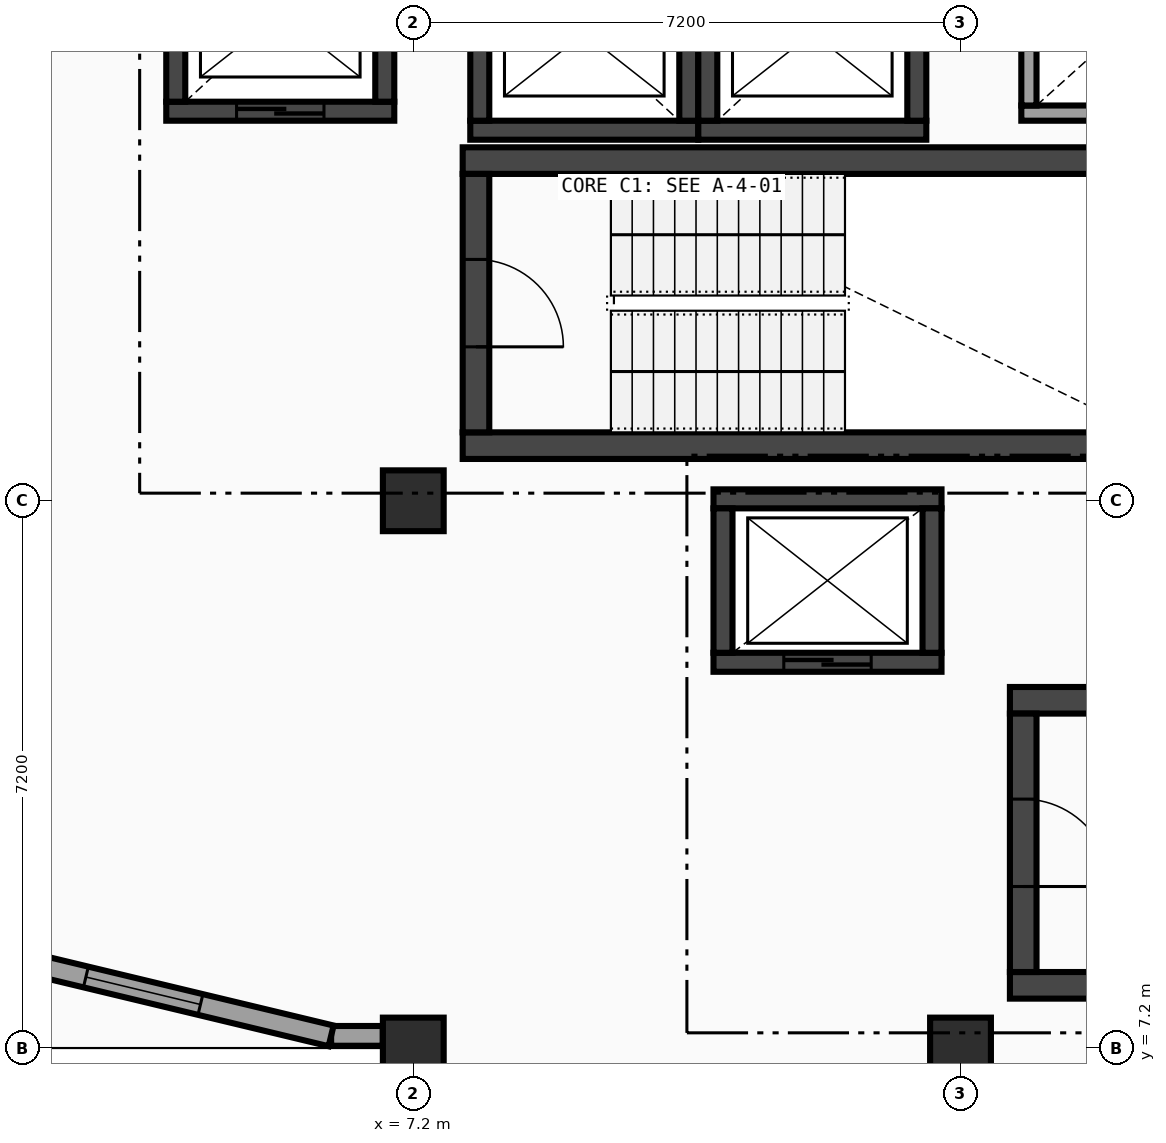
"""IFC4 building model, lengths in metres.
Left out: names, types, materials, properties, quantities, classifications, styles, units other than length and angle.
Written with IfcOpenShell. Run it as: python <this file> out.ifc"""

import sys

from ifc_helpers import new_model, si_unit, direction, frame, frame_2d, origin, origin_2d, place, context, subcontext, project, spatial, rectangle, extrude, element, fill, save


model = new_model("IFC4")
c1 = context("Model", 3, precision=1e-05, world=origin(), true_north=direction((0.0, 1.0)))
c2 = subcontext(c1, "Body", "Model", "MODEL_VIEW")
j1 = project(units=[si_unit("LENGTHUNIT", "METRE"), si_unit("PLANEANGLEUNIT", "RADIAN")], contexts=[c1])
p1 = place(None, origin())
s1 = spatial("IfcSite", under=j1, at=p1, CompositionType="ELEMENT")
p2 = place(p1, origin())
s2 = spatial("IfcBuilding", under=s1, at=p2, CompositionType="ELEMENT")
p3 = place(p2, frame((0.0, 0.0, 14.7)))
s3 = spatial("IfcBuildingStorey", under=s2, at=p3, CompositionType="ELEMENT", Elevation=14.7)
for number, where, z_axis, x_axis in (
    (1, (7.2, 7.2, 0.0), (0.0, 0.0, 1.0), (1.0, 0.0, 0.0)),
    (2, (7.2, 14.4, 0.0), (0.0, 0.0, 1.0), (1.0, 0.0, 0.0)),
    (3, (14.4, 7.2, 0.0), (0.0, 0.0, 1.0), (1.0, 0.0, 0.0)),
):
    element("IfcColumn", number, at=place(p3, frame(where, z_axis=z_axis, x_axis=x_axis)), inside=s3, PredefinedType="COLUMN", context=c2, shape_type="SweptSolid", body=[
        extrude(rectangle(XDim=0.8, YDim=0.8, at=origin_2d()), origin(), (0.0, 0.0, 1.0), 4.2),
    ])
p4 = place(p3, frame((6.799, 7.36, 0.0), z_axis=(0.0, 0.0, 1.0), x_axis=(-1.0, 0.0, 0.0)))
e4 = element("IfcWall", 4, at=p4, inside=s3, PredefinedType="SOLIDWALL", context=c2, shape_type="SweptSolid", body=[
    extrude(rectangle(XDim=0.68, YDim=0.26, at=frame_2d((0.34, 0.0))), origin(), (0.0, 0.0, 1.0), 3.352),
])
p5 = place(p3, frame((6.119, 7.36, 0.0), z_axis=(0.0, 0.0, 1.0), x_axis=(-0.972372921374, 0.233432863536, 0.0)))
e5 = element("IfcWall", 5, at=p5, inside=s3, PredefinedType="SOLIDWALL", context=c2, shape_type="SweptSolid", body=[
    extrude(rectangle(XDim=5.086, YDim=0.28, at=frame_2d((2.543, 0.0))), origin(), (0.0, 0.0, 1.0), 3.352),
])
p6 = place(p5, frame((1.768, 0.0, 0.8)))
e6 = element("IfcOpeningElement", 6, at=p6, cuts=e5, PredefinedType="OPENING", context=c2, shape_type="SweptSolid", body=[
    extrude(rectangle(XDim=1.55, YDim=1.8, at=frame_2d((0.775, 0.9))), frame((0.0, 0.15, 0.0), z_axis=(0.0, -1.0, 0.0), x_axis=(1.0, 0.0, 0.0)), (0.0, 0.0, 1.0), 0.3),
])
for number, where, z_axis, x_axis in (
    (7, (7.85, 15.125, 0.0), (0.0, 0.0, 1.0), (1.0, 0.0, 0.0)),
    (8, (17.15, 18.875, 0.0), (0.0, 0.0, 1.0), (-1.0, 0.0, 0.0)),
):
    element("IfcWall", number, at=place(p3, frame(where, z_axis=z_axis, x_axis=x_axis)), inside=s3, PredefinedType="SHEAR", context=c2, shape_type="SweptSolid", body=[
        extrude(rectangle(XDim=9.3, YDim=0.35, at=frame_2d((4.65, 0.0))), origin(), (0.0, 0.0, 1.0), 3.95),
    ])
p7 = place(p3, frame((8.025, 18.7, 0.0), z_axis=(0.0, 0.0, 1.0), x_axis=(0.0, -1.0, 0.0)))
e9 = element("IfcWall", 9, at=p7, inside=s3, PredefinedType="SHEAR", context=c2, shape_type="SweptSolid", body=[
    extrude(rectangle(XDim=3.4, YDim=0.35, at=frame_2d((1.7, 0.0))), origin(), (0.0, 0.0, 1.0), 3.95),
])
p8 = place(p7, frame((1.125, 0.0, 0.0)))
e10 = element("IfcOpeningElement", 10, at=p8, cuts=e9, PredefinedType="OPENING", context=c2, shape_type="SweptSolid", body=[
    extrude(rectangle(XDim=1.15, YDim=2.1, at=frame_2d((0.575, 1.05))), frame((0.0, 0.185, 0.0), z_axis=(0.0, -1.0, 0.0), x_axis=(1.0, 0.0, 0.0)), (0.0, 0.0, 1.0), 0.37),
])
p9 = place(p3, frame((3.95, 19.525, 0.0), z_axis=(0.0, 0.0, 1.0), x_axis=(1.0, 0.0, 0.0)))
e11 = element("IfcWall", 11, at=p9, inside=s3, PredefinedType="SHEAR", context=c2, shape_type="SweptSolid", body=[
    extrude(rectangle(XDim=3.0, YDim=0.25, at=frame_2d((1.5, 0.0))), origin(), (0.0, 0.0, 1.0), 3.95),
])
p10 = place(p9, frame((0.925, 0.0, 0.0)))
e12 = element("IfcOpeningElement", 12, at=p10, cuts=e11, PredefinedType="OPENING", context=c2, shape_type="SweptSolid", body=[
    extrude(rectangle(XDim=1.15, YDim=2.1, at=frame_2d((0.575, 1.05))), frame((0.0, 0.135, 0.0), z_axis=(0.0, -1.0, 0.0), x_axis=(1.0, 0.0, 0.0)), (0.0, 0.0, 1.0), 0.27),
])
for number, where, z_axis, x_axis in (
    (13, (4.075, 21.95, 0.0), (0.0, 0.0, 1.0), (0.0, -1.0, 0.0)),
    (14, (6.825, 19.65, 0.0), (0.0, 0.0, 1.0), (0.0, 1.0, 0.0)),
):
    element("IfcWall", number, at=place(p3, frame(where, z_axis=z_axis, x_axis=x_axis)), inside=s3, PredefinedType="SHEAR", context=c2, shape_type="SweptSolid", body=[
        extrude(rectangle(XDim=2.3, YDim=0.25, at=frame_2d((1.15, 0.0))), origin(), (0.0, 0.0, 1.0), 3.95),
    ])
p11 = place(p3, frame((7.95, 19.275, 0.0), z_axis=(0.0, 0.0, 1.0), x_axis=(1.0, 0.0, 0.0)))
e15 = element("IfcWall", 15, at=p11, inside=s3, PredefinedType="SHEAR", context=c2, shape_type="SweptSolid", body=[
    extrude(rectangle(XDim=3.0, YDim=0.25, at=frame_2d((1.5, 0.0))), origin(), (0.0, 0.0, 1.0), 3.95),
])
for number, where, z_axis, x_axis in (
    (16, (8.075, 21.7, 0.0), (0.0, 0.0, 1.0), (0.0, -1.0, 0.0)),
    (17, (10.825, 19.4, 0.0), (0.0, 0.0, 1.0), (0.0, 1.0, 0.0)),
):
    element("IfcWall", number, at=place(p3, frame(where, z_axis=z_axis, x_axis=x_axis)), inside=s3, PredefinedType="SHEAR", context=c2, shape_type="SweptSolid", body=[
        extrude(rectangle(XDim=2.3, YDim=0.25, at=frame_2d((1.15, 0.0))), origin(), (0.0, 0.0, 1.0), 3.95),
    ])
p12 = place(p3, frame((10.95, 19.275, 0.0), z_axis=(0.0, 0.0, 1.0), x_axis=(1.0, 0.0, 0.0)))
e18 = element("IfcWall", 18, at=p12, inside=s3, PredefinedType="SHEAR", context=c2, shape_type="SweptSolid", body=[
    extrude(rectangle(XDim=3.0, YDim=0.25, at=frame_2d((1.5, 0.0))), origin(), (0.0, 0.0, 1.0), 3.95),
])
for number, where, z_axis, x_axis in (
    (19, (11.075, 21.7, 0.0), (0.0, 0.0, 1.0), (0.0, -1.0, 0.0)),
    (20, (13.825, 19.4, 0.0), (0.0, 0.0, 1.0), (0.0, 1.0, 0.0)),
):
    element("IfcWall", number, at=place(p3, frame(where, z_axis=z_axis, x_axis=x_axis)), inside=s3, PredefinedType="SHEAR", context=c2, shape_type="SweptSolid", body=[
        extrude(rectangle(XDim=2.3, YDim=0.25, at=frame_2d((1.15, 0.0))), origin(), (0.0, 0.0, 1.0), 3.95),
    ])
for number, where, z_axis, x_axis in (
    (21, (15.05, 8.025, 0.0), (0.0, 0.0, 1.0), (1.0, 0.0, 0.0)),
    (22, (24.35, 11.775, 0.0), (0.0, 0.0, 1.0), (-1.0, 0.0, 0.0)),
):
    element("IfcWall", number, at=place(p3, frame(where, z_axis=z_axis, x_axis=x_axis)), inside=s3, PredefinedType="SHEAR", context=c2, shape_type="SweptSolid", body=[
        extrude(rectangle(XDim=9.3, YDim=0.35, at=frame_2d((4.65, 0.0))), origin(), (0.0, 0.0, 1.0), 3.95),
    ])
p13 = place(p3, frame((15.225, 11.6, 0.0), z_axis=(0.0, 0.0, 1.0), x_axis=(0.0, -1.0, 0.0)))
e23 = element("IfcWall", 23, at=p13, inside=s3, PredefinedType="SHEAR", context=c2, shape_type="SweptSolid", body=[
    extrude(rectangle(XDim=3.4, YDim=0.35, at=frame_2d((1.7, 0.0))), origin(), (0.0, 0.0, 1.0), 3.95),
])
p14 = place(p13, frame((1.125, 0.0, 0.0)))
e24 = element("IfcOpeningElement", 24, at=p14, cuts=e23, PredefinedType="OPENING", context=c2, shape_type="SweptSolid", body=[
    extrude(rectangle(XDim=1.15, YDim=2.1, at=frame_2d((0.575, 1.05))), frame((0.0, 0.185, 0.0), z_axis=(0.0, -1.0, 0.0), x_axis=(1.0, 0.0, 0.0)), (0.0, 0.0, 1.0), 0.37),
])
p15 = place(p3, frame((11.15, 12.275, 0.0), z_axis=(0.0, 0.0, 1.0), x_axis=(1.0, 0.0, 0.0)))
e25 = element("IfcWall", 25, at=p15, inside=s3, PredefinedType="SHEAR", context=c2, shape_type="SweptSolid", body=[
    extrude(rectangle(XDim=3.0, YDim=0.25, at=frame_2d((1.5, 0.0))), origin(), (0.0, 0.0, 1.0), 3.95),
])
p16 = place(p15, frame((0.925, 0.0, 0.0)))
e26 = element("IfcOpeningElement", 26, at=p16, cuts=e25, PredefinedType="OPENING", context=c2, shape_type="SweptSolid", body=[
    extrude(rectangle(XDim=1.15, YDim=2.1, at=frame_2d((0.575, 1.05))), frame((0.0, 0.135, 0.0), z_axis=(0.0, -1.0, 0.0), x_axis=(1.0, 0.0, 0.0)), (0.0, 0.0, 1.0), 0.27),
])
p17 = place(p3, frame((14.15, 14.425, 0.0), z_axis=(0.0, 0.0, 1.0), x_axis=(-1.0, 0.0, 0.0)))
e27 = element("IfcWall", 27, at=p17, inside=s3, PredefinedType="SHEAR", context=c2, shape_type="SweptSolid", body=[
    extrude(rectangle(XDim=3.0, YDim=0.25, at=frame_2d((1.5, 0.0))), origin(), (0.0, 0.0, 1.0), 3.95),
])
for number, where, z_axis, x_axis in (
    (28, (11.275, 14.3, 0.0), (0.0, 0.0, 1.0), (0.0, -1.0, 0.0)),
    (29, (14.025, 12.4, 0.0), (0.0, 0.0, 1.0), (0.0, 1.0, 0.0)),
):
    element("IfcWall", number, at=place(p3, frame(where, z_axis=z_axis, x_axis=x_axis)), inside=s3, PredefinedType="SHEAR", context=c2, shape_type="SweptSolid", body=[
        extrude(rectangle(XDim=1.9, YDim=0.25, at=frame_2d((0.95, 0.0))), origin(), (0.0, 0.0, 1.0), 3.95),
    ])
p18 = place(p3, frame((15.2, 19.5, 0.0), z_axis=(0.0, 0.0, 1.0), x_axis=(1.0, 0.0, 0.0)))
e30 = element("IfcWall", 30, at=p18, inside=s3, PredefinedType="SOLIDWALL", context=c2, shape_type="SweptSolid", body=[
    extrude(rectangle(XDim=1.6, YDim=0.2, at=frame_2d((0.8, 0.0))), origin(), (0.0, 0.0, 1.0), 3.95),
])
p19 = place(p3, frame((15.3, 20.68, 0.0), z_axis=(0.0, 0.0, 1.0), x_axis=(0.0, -1.0, 0.0)))
e31 = element("IfcWall", 31, at=p19, inside=s3, PredefinedType="SOLIDWALL", context=c2, shape_type="SweptSolid", body=[
    extrude(rectangle(XDim=1.08, YDim=0.2, at=frame_2d((0.54, 0.0))), origin(), (0.0, 0.0, 1.0), 3.95),
])
p20 = place(p6, origin())
e32 = element("IfcWindow", 32, at=p20, inside=s3, PartitioningType="SINGLE_PANEL", PredefinedType="WINDOW", context=c2, shape_type="SweptSolid", body=[
    extrude(rectangle(XDim=1.55, YDim=1.8, at=frame_2d((0.775, 0.9))), frame((0.0, 0.03, 0.0), z_axis=(0.0, -1.0, 0.0), x_axis=(1.0, 0.0, 0.0)), (0.0, 0.0, 1.0), 0.06),
])
fill(e6, e32)
p21 = place(p8, frame((1.15, 0.0, 0.0), z_axis=(0.0, 0.0, 1.0), x_axis=(-1.0, 0.0, 0.0)))
e33 = element("IfcDoor", 33, at=p21, inside=s3, OperationType="SINGLE_SWING_LEFT", PredefinedType="DOOR", context=c2, shape_type="SweptSolid", body=[
    extrude(rectangle(XDim=1.15, YDim=2.1, at=frame_2d((0.575, 1.05))), frame((0.0, 0.025, 0.0), z_axis=(0.0, -1.0, 0.0), x_axis=(1.0, 0.0, 0.0)), (0.0, 0.0, 1.0), 0.05),
])
fill(e10, e33)
p22 = place(p10, origin())
e34 = element("IfcDoor", 34, at=p22, inside=s3, OperationType="SLIDING_TO_RIGHT", PredefinedType="DOOR", context=c2, shape_type="SweptSolid", body=[
    extrude(rectangle(XDim=1.15, YDim=2.1, at=frame_2d((0.575, 1.05))), frame((0.0, 0.025, 0.0), z_axis=(0.0, -1.0, 0.0), x_axis=(1.0, 0.0, 0.0)), (0.0, 0.0, 1.0), 0.05),
])
fill(e12, e34)
p23 = place(p14, frame((1.15, 0.0, 0.0), z_axis=(0.0, 0.0, 1.0), x_axis=(-1.0, 0.0, 0.0)))
e35 = element("IfcDoor", 35, at=p23, inside=s3, OperationType="SINGLE_SWING_LEFT", PredefinedType="DOOR", context=c2, shape_type="SweptSolid", body=[
    extrude(rectangle(XDim=1.15, YDim=2.1, at=frame_2d((0.575, 1.05))), frame((0.0, 0.025, 0.0), z_axis=(0.0, -1.0, 0.0), x_axis=(1.0, 0.0, 0.0)), (0.0, 0.0, 1.0), 0.05),
])
fill(e24, e35)
p24 = place(p16, origin())
e36 = element("IfcDoor", 36, at=p24, inside=s3, OperationType="SLIDING_TO_RIGHT", PredefinedType="DOOR", context=c2, shape_type="SweptSolid", body=[
    extrude(rectangle(XDim=1.15, YDim=2.1, at=frame_2d((0.575, 1.05))), frame((0.0, 0.025, 0.0), z_axis=(0.0, -1.0, 0.0), x_axis=(1.0, 0.0, 0.0)), (0.0, 0.0, 1.0), 0.05),
])
fill(e26, e36)
save(model, sys.argv[1])
